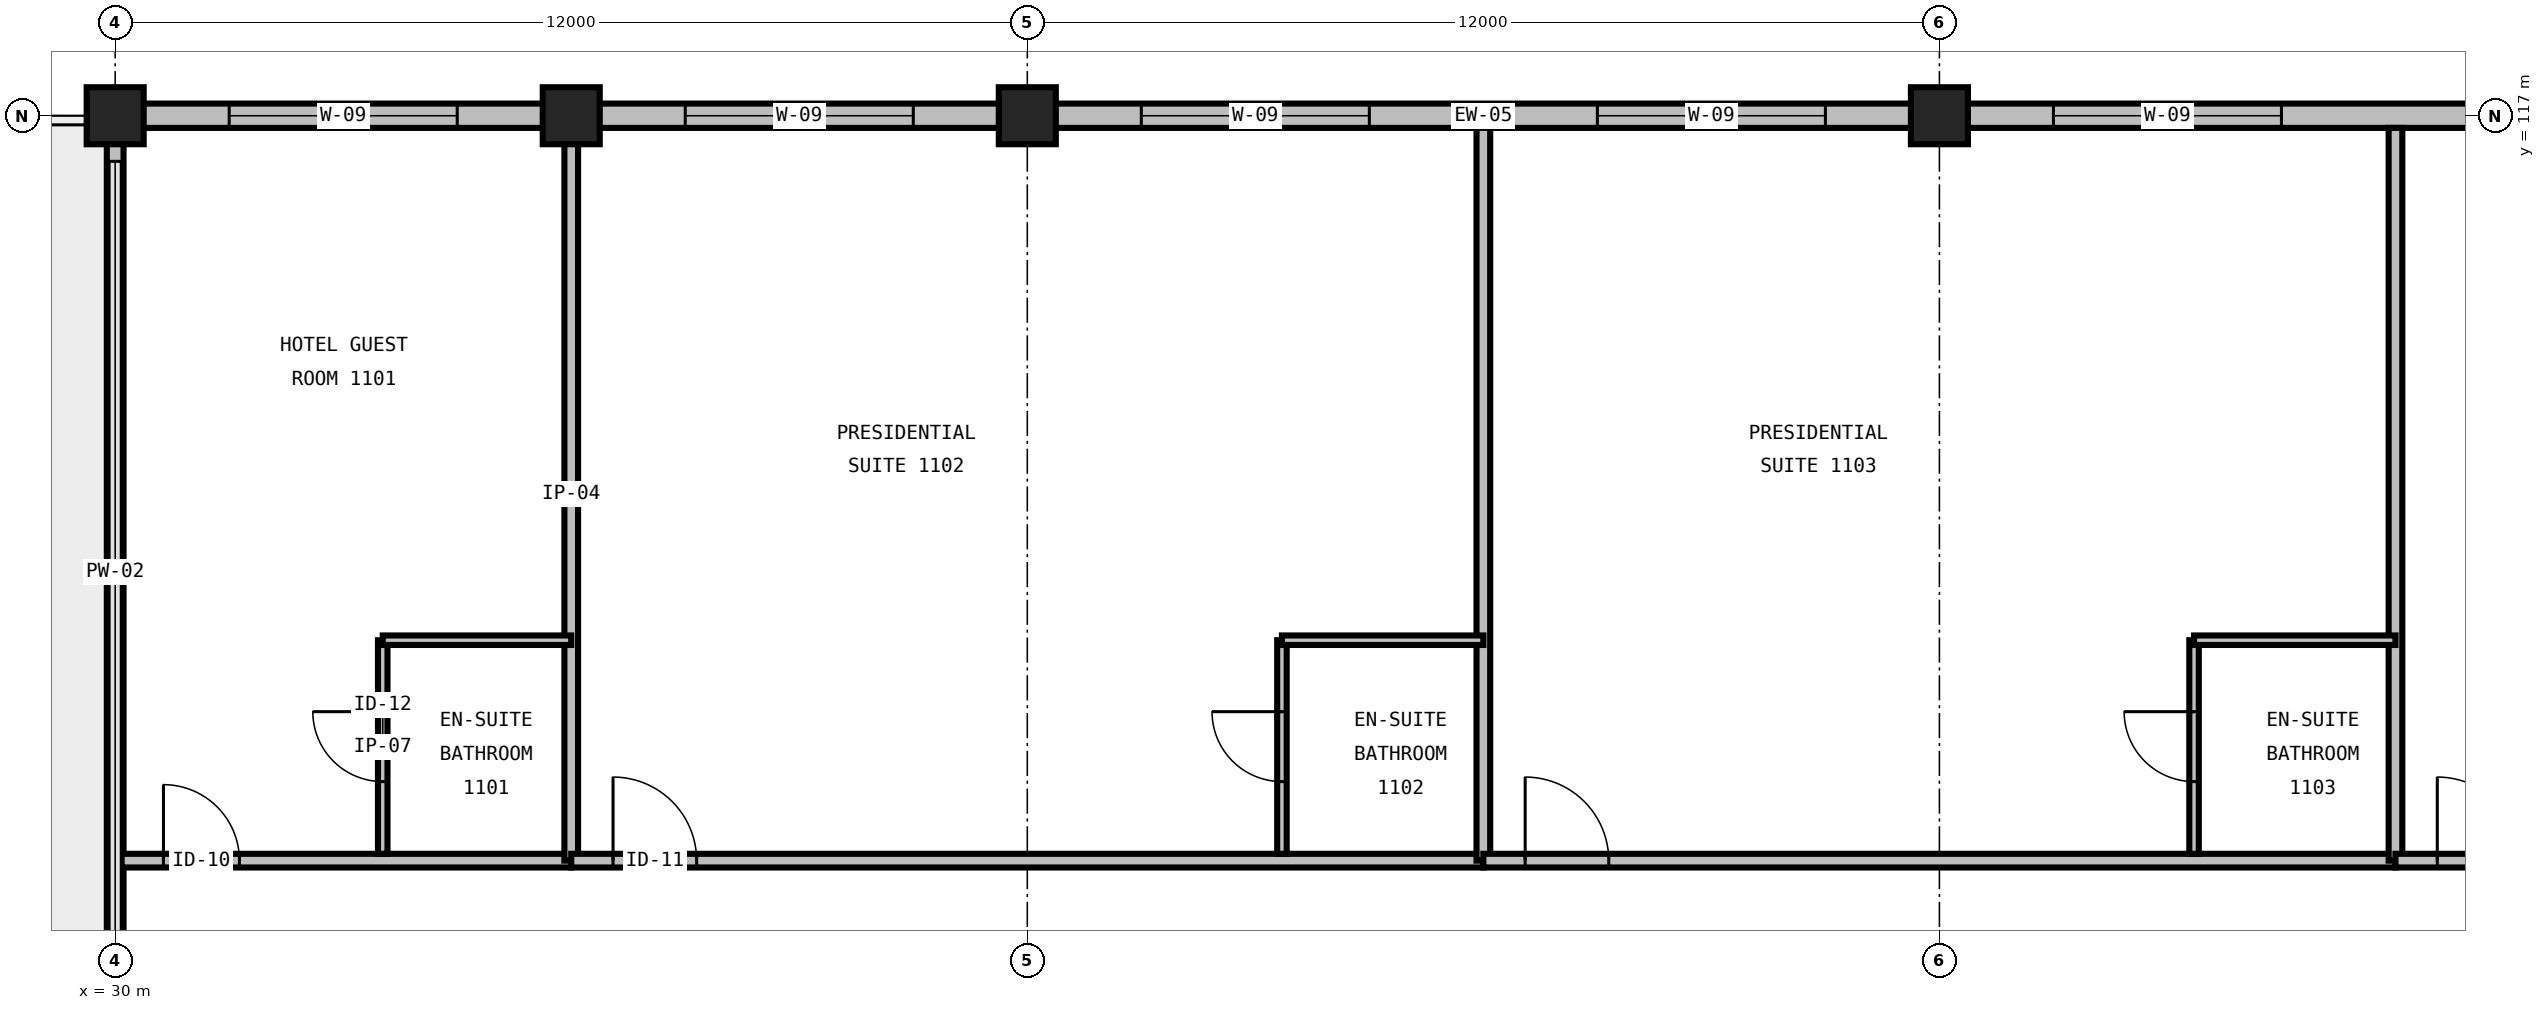
"""IFC4 building model, lengths in metres.
Left out: names, types, materials, properties, quantities, classifications, styles, units other than length and angle.
Written with IfcOpenShell. Run it as: python <this file> out.ifc"""

import sys

from ifc_helpers import new_model, si_unit, direction, frame, frame_2d, origin, origin_2d, place, context, subcontext, project, spatial, rectangle, extrude, element, fill, save


model = new_model("IFC4")
c1 = context("Model", 3, precision=1e-05, world=origin(), true_north=direction((0.0, 1.0)))
c2 = subcontext(c1, "Body", "Model", "MODEL_VIEW")
j1 = project(units=[si_unit("LENGTHUNIT", "METRE"), si_unit("PLANEANGLEUNIT", "RADIAN")], contexts=[c1])
p1 = place(None, origin())
s1 = spatial("IfcSite", under=j1, at=p1, CompositionType="ELEMENT")
p2 = place(p1, origin())
s2 = spatial("IfcBuilding", under=s1, at=p2, CompositionType="ELEMENT")
p3 = place(p2, frame((0.0, 0.0, 49.2)))
s3 = spatial("IfcBuildingStorey", under=s2, at=p3, CompositionType="ELEMENT", Elevation=49.2)
for number, where, z_axis, x_axis in (
    (1, (30.0, 117.0, 0.0), (0.0, 0.0, 1.0), (1.0, 0.0, 0.0)),
    (2, (36.0, 117.0, 0.0), (0.0, 0.0, 1.0), (1.0, 0.0, 0.0)),
    (3, (42.0, 117.0, 0.0), (0.0, 0.0, 1.0), (1.0, 0.0, 0.0)),
    (4, (54.0, 117.0, 0.0), (0.0, 0.0, 1.0), (1.0, 0.0, 0.0)),
):
    element("IfcColumn", number, at=place(p3, frame(where, z_axis=z_axis, x_axis=x_axis)), inside=s3, PredefinedType="COLUMN", context=c2, shape_type="SweptSolid", body=[
        extrude(rectangle(XDim=0.75, YDim=0.75, at=origin_2d()), origin(), (0.0, 0.0, 1.0), 3.6),
    ])
p4 = place(p3, frame((36.0, 117.0, 0.0), z_axis=(0.0, 0.0, 1.0), x_axis=(-1.0, 0.0, 0.0)))
e5 = element("IfcWall", 5, at=p4, inside=s3, PredefinedType="STANDARD", context=c2, shape_type="SweptSolid", body=[
    extrude(rectangle(XDim=6.0, YDim=0.32, at=frame_2d((3.0, 0.0))), origin(), (0.0, 0.0, 1.0), 2.536),
])
p5 = place(p4, frame((1.5, 0.0, 0.7)))
e6 = element("IfcOpeningElement", 6, at=p5, cuts=e5, PredefinedType="OPENING", context=c2, shape_type="SweptSolid", body=[
    extrude(rectangle(XDim=3.0, YDim=1.71, at=frame_2d((1.5, 0.855))), frame((0.0, 0.175, 0.0), z_axis=(0.0, -1.0, 0.0), x_axis=(1.0, 0.0, 0.0)), (0.0, 0.0, 1.0), 0.35),
])
p6 = place(p3, frame((42.0, 117.0, 0.0), z_axis=(0.0, 0.0, 1.0), x_axis=(-1.0, 0.0, 0.0)))
e7 = element("IfcWall", 7, at=p6, inside=s3, PredefinedType="STANDARD", context=c2, shape_type="SweptSolid", body=[
    extrude(rectangle(XDim=6.0, YDim=0.32, at=frame_2d((3.0, 0.0))), origin(), (0.0, 0.0, 1.0), 2.536),
])
p7 = place(p6, frame((1.5, 0.0, 0.7)))
e8 = element("IfcOpeningElement", 8, at=p7, cuts=e7, PredefinedType="OPENING", context=c2, shape_type="SweptSolid", body=[
    extrude(rectangle(XDim=3.0, YDim=1.71, at=frame_2d((1.5, 0.855))), frame((0.0, 0.175, 0.0), z_axis=(0.0, -1.0, 0.0), x_axis=(1.0, 0.0, 0.0)), (0.0, 0.0, 1.0), 0.35),
])
p8 = place(p3, frame((54.0, 117.0, 0.0), z_axis=(0.0, 0.0, 1.0), x_axis=(-1.0, 0.0, 0.0)))
e9 = element("IfcWall", 9, at=p8, inside=s3, PredefinedType="STANDARD", context=c2, shape_type="SweptSolid", body=[
    extrude(rectangle(XDim=12.0, YDim=0.32, at=frame_2d((6.0, 0.0))), origin(), (0.0, 0.0, 1.0), 2.536),
])
p9 = place(p8, frame((1.5, 0.0, 0.7)))
e10 = element("IfcOpeningElement", 10, at=p9, cuts=e9, PredefinedType="OPENING", context=c2, shape_type="SweptSolid", body=[
    extrude(rectangle(XDim=3.0, YDim=1.71, at=frame_2d((1.5, 0.855))), frame((0.0, 0.175, 0.0), z_axis=(0.0, -1.0, 0.0), x_axis=(1.0, 0.0, 0.0)), (0.0, 0.0, 1.0), 0.35),
])
p10 = place(p8, frame((7.5, 0.0, 0.7)))
e11 = element("IfcOpeningElement", 11, at=p10, cuts=e9, PredefinedType="OPENING", context=c2, shape_type="SweptSolid", body=[
    extrude(rectangle(XDim=3.0, YDim=1.71, at=frame_2d((1.5, 0.855))), frame((0.0, 0.175, 0.0), z_axis=(0.0, -1.0, 0.0), x_axis=(1.0, 0.0, 0.0)), (0.0, 0.0, 1.0), 0.35),
])
p11 = place(p3, frame((66.0, 117.0, 0.0), z_axis=(0.0, 0.0, 1.0), x_axis=(-1.0, 0.0, 0.0)))
e12 = element("IfcWall", 12, at=p11, inside=s3, PredefinedType="STANDARD", context=c2, shape_type="SweptSolid", body=[
    extrude(rectangle(XDim=12.0, YDim=0.32, at=frame_2d((6.0, 0.0))), origin(), (0.0, 0.0, 1.0), 2.536),
])
p12 = place(p11, frame((1.5, 0.0, 0.7)))
e13 = element("IfcOpeningElement", 13, at=p12, cuts=e12, PredefinedType="OPENING", context=c2, shape_type="SweptSolid", body=[
    extrude(rectangle(XDim=3.0, YDim=1.71, at=frame_2d((1.5, 0.855))), frame((0.0, 0.175, 0.0), z_axis=(0.0, -1.0, 0.0), x_axis=(1.0, 0.0, 0.0)), (0.0, 0.0, 1.0), 0.35),
])
p13 = place(p11, frame((7.5, 0.0, 0.7)))
e14 = element("IfcOpeningElement", 14, at=p13, cuts=e12, PredefinedType="OPENING", context=c2, shape_type="SweptSolid", body=[
    extrude(rectangle(XDim=3.0, YDim=1.71, at=frame_2d((1.5, 0.855))), frame((0.0, 0.175, 0.0), z_axis=(0.0, -1.0, 0.0), x_axis=(1.0, 0.0, 0.0)), (0.0, 0.0, 1.0), 0.35),
])
p14 = place(p3, frame((30.0, 117.0, 0.0), z_axis=(0.0, 0.0, 1.0), x_axis=(0.0, -1.0, 0.0)))
e15 = element("IfcWall", 15, at=p14, inside=s3, PredefinedType="PARAPET", context=c2, shape_type="SweptSolid", body=[
    extrude(rectangle(XDim=12.0, YDim=0.22, at=frame_2d((6.0, 0.0))), origin(), (0.0, 0.0, 1.0), 0.2),
])
p15 = place(p3, frame((30.085, 107.2, 0.0), z_axis=(0.0, 0.0, 1.0), x_axis=(1.0, 0.0, 0.0)))
e16 = element("IfcWall", 16, at=p15, inside=s3, PredefinedType="PARTITIONING", context=c2, shape_type="SweptSolid", body=[
    extrude(rectangle(XDim=5.915, YDim=0.18, at=frame_2d((2.957, 0.0))), origin(), (0.0, 0.0, 1.0), 3.29),
])
p16 = place(p15, frame((0.55, 0.0, 0.0)))
e17 = element("IfcOpeningElement", 17, at=p16, cuts=e16, PredefinedType="OPENING", context=c2, shape_type="SweptSolid", body=[
    extrude(rectangle(XDim=1.0, YDim=2.15, at=frame_2d((0.5, 1.075))), frame((0.0, 0.105, 0.0), z_axis=(0.0, -1.0, 0.0), x_axis=(1.0, 0.0, 0.0)), (0.0, 0.0, 1.0), 0.21),
])
p17 = place(p3, frame((36.0, 107.2, 0.0), z_axis=(0.0, 0.0, 1.0), x_axis=(0.0, 1.0, 0.0)))
e18 = element("IfcWall", 18, at=p17, inside=s3, PredefinedType="PARTITIONING", context=c2, shape_type="SweptSolid", body=[
    extrude(rectangle(XDim=9.64, YDim=0.18, at=frame_2d((4.82, 0.0))), origin(), (0.0, 0.0, 1.0), 2.59),
])
p18 = place(p3, frame((33.52, 107.29, 0.0), z_axis=(0.0, 0.0, 1.0), x_axis=(0.0, 1.0, 0.0)))
e19 = element("IfcWall", 19, at=p18, inside=s3, PredefinedType="PARTITIONING", context=c2, shape_type="SweptSolid", body=[
    extrude(rectangle(XDim=2.81, YDim=0.125, at=frame_2d((1.405, 0.0))), origin(), (0.0, 0.0, 1.0), 3.29),
])
p19 = place(p18, frame((0.95, 0.0, 0.0)))
e20 = element("IfcOpeningElement", 20, at=p19, cuts=e19, PredefinedType="OPENING", context=c2, shape_type="SweptSolid", body=[
    extrude(rectangle(XDim=0.92, YDim=2.1, at=frame_2d((0.46, 1.05))), frame((0.0, 0.077, 0.0), z_axis=(0.0, -1.0, 0.0), x_axis=(1.0, 0.0, 0.0)), (0.0, 0.0, 1.0), 0.155),
])
p20 = place(p3, frame((33.52, 110.1, 0.0), z_axis=(0.0, 0.0, 1.0), x_axis=(1.0, 0.0, 0.0)))
e21 = element("IfcWall", 21, at=p20, inside=s3, PredefinedType="PARTITIONING", context=c2, shape_type="SweptSolid", body=[
    extrude(rectangle(XDim=2.48, YDim=0.125, at=frame_2d((1.24, 0.0))), origin(), (0.0, 0.0, 1.0), 3.29),
])
p21 = place(p3, frame((36.0, 107.2, 0.0), z_axis=(0.0, 0.0, 1.0), x_axis=(1.0, 0.0, 0.0)))
e22 = element("IfcWall", 22, at=p21, inside=s3, PredefinedType="PARTITIONING", context=c2, shape_type="SweptSolid", body=[
    extrude(rectangle(XDim=12.0, YDim=0.18, at=frame_2d((6.0, 0.0))), origin(), (0.0, 0.0, 1.0), 3.29),
])
p22 = place(p21, frame((0.55, 0.0, 0.0)))
e23 = element("IfcOpeningElement", 23, at=p22, cuts=e22, PredefinedType="OPENING", context=c2, shape_type="SweptSolid", body=[
    extrude(rectangle(XDim=1.1, YDim=2.2, at=frame_2d((0.55, 1.1))), frame((0.0, 0.105, 0.0), z_axis=(0.0, -1.0, 0.0), x_axis=(1.0, 0.0, 0.0)), (0.0, 0.0, 1.0), 0.21),
])
p23 = place(p3, frame((48.0, 107.2, 0.0), z_axis=(0.0, 0.0, 1.0), x_axis=(0.0, 1.0, 0.0)))
e24 = element("IfcWall", 24, at=p23, inside=s3, PredefinedType="PARTITIONING", context=c2, shape_type="SweptSolid", body=[
    extrude(rectangle(XDim=9.64, YDim=0.18, at=frame_2d((4.82, 0.0))), origin(), (0.0, 0.0, 1.0), 3.29),
])
p24 = place(p3, frame((45.35, 107.29, 0.0), z_axis=(0.0, 0.0, 1.0), x_axis=(0.0, 1.0, 0.0)))
e25 = element("IfcWall", 25, at=p24, inside=s3, PredefinedType="PARTITIONING", context=c2, shape_type="SweptSolid", body=[
    extrude(rectangle(XDim=2.81, YDim=0.125, at=frame_2d((1.405, 0.0))), origin(), (0.0, 0.0, 1.0), 3.29),
])
p25 = place(p24, frame((0.95, 0.0, 0.0)))
e26 = element("IfcOpeningElement", 26, at=p25, cuts=e25, PredefinedType="OPENING", context=c2, shape_type="SweptSolid", body=[
    extrude(rectangle(XDim=0.92, YDim=2.1, at=frame_2d((0.46, 1.05))), frame((0.0, 0.077, 0.0), z_axis=(0.0, -1.0, 0.0), x_axis=(1.0, 0.0, 0.0)), (0.0, 0.0, 1.0), 0.155),
])
p26 = place(p3, frame((45.35, 110.1, 0.0), z_axis=(0.0, 0.0, 1.0), x_axis=(1.0, 0.0, 0.0)))
e27 = element("IfcWall", 27, at=p26, inside=s3, PredefinedType="PARTITIONING", context=c2, shape_type="SweptSolid", body=[
    extrude(rectangle(XDim=2.65, YDim=0.125, at=frame_2d((1.325, 0.0))), origin(), (0.0, 0.0, 1.0), 3.29),
])
p27 = place(p3, frame((48.0, 107.2, 0.0), z_axis=(0.0, 0.0, 1.0), x_axis=(1.0, 0.0, 0.0)))
e28 = element("IfcWall", 28, at=p27, inside=s3, PredefinedType="PARTITIONING", context=c2, shape_type="SweptSolid", body=[
    extrude(rectangle(XDim=12.0, YDim=0.18, at=frame_2d((6.0, 0.0))), origin(), (0.0, 0.0, 1.0), 3.29),
])
p28 = place(p27, frame((0.55, 0.0, 0.0)))
e29 = element("IfcOpeningElement", 29, at=p28, cuts=e28, PredefinedType="OPENING", context=c2, shape_type="SweptSolid", body=[
    extrude(rectangle(XDim=1.1, YDim=2.2, at=frame_2d((0.55, 1.1))), frame((0.0, 0.105, 0.0), z_axis=(0.0, -1.0, 0.0), x_axis=(1.0, 0.0, 0.0)), (0.0, 0.0, 1.0), 0.21),
])
p29 = place(p3, frame((60.0, 107.2, 0.0), z_axis=(0.0, 0.0, 1.0), x_axis=(0.0, 1.0, 0.0)))
e30 = element("IfcWall", 30, at=p29, inside=s3, PredefinedType="PARTITIONING", context=c2, shape_type="SweptSolid", body=[
    extrude(rectangle(XDim=9.64, YDim=0.18, at=frame_2d((4.82, 0.0))), origin(), (0.0, 0.0, 1.0), 3.29),
])
p30 = place(p3, frame((57.35, 107.29, 0.0), z_axis=(0.0, 0.0, 1.0), x_axis=(0.0, 1.0, 0.0)))
e31 = element("IfcWall", 31, at=p30, inside=s3, PredefinedType="PARTITIONING", context=c2, shape_type="SweptSolid", body=[
    extrude(rectangle(XDim=2.81, YDim=0.125, at=frame_2d((1.405, 0.0))), origin(), (0.0, 0.0, 1.0), 3.29),
])
p31 = place(p30, frame((0.95, 0.0, 0.0)))
e32 = element("IfcOpeningElement", 32, at=p31, cuts=e31, PredefinedType="OPENING", context=c2, shape_type="SweptSolid", body=[
    extrude(rectangle(XDim=0.92, YDim=2.1, at=frame_2d((0.46, 1.05))), frame((0.0, 0.077, 0.0), z_axis=(0.0, -1.0, 0.0), x_axis=(1.0, 0.0, 0.0)), (0.0, 0.0, 1.0), 0.155),
])
p32 = place(p3, frame((57.35, 110.1, 0.0), z_axis=(0.0, 0.0, 1.0), x_axis=(1.0, 0.0, 0.0)))
e33 = element("IfcWall", 33, at=p32, inside=s3, PredefinedType="PARTITIONING", context=c2, shape_type="SweptSolid", body=[
    extrude(rectangle(XDim=2.65, YDim=0.125, at=frame_2d((1.325, 0.0))), origin(), (0.0, 0.0, 1.0), 3.29),
])
p33 = place(p3, frame((60.0, 107.2, 0.0), z_axis=(0.0, 0.0, 1.0), x_axis=(1.0, 0.0, 0.0)))
e34 = element("IfcWall", 34, at=p33, inside=s3, PredefinedType="PARTITIONING", context=c2, shape_type="SweptSolid", body=[
    extrude(rectangle(XDim=12.0, YDim=0.18, at=frame_2d((6.0, 0.0))), origin(), (0.0, 0.0, 1.0), 3.29),
])
p34 = place(p33, frame((0.55, 0.0, 0.0)))
e35 = element("IfcOpeningElement", 35, at=p34, cuts=e34, PredefinedType="OPENING", context=c2, shape_type="SweptSolid", body=[
    extrude(rectangle(XDim=1.1, YDim=2.2, at=frame_2d((0.55, 1.1))), frame((0.0, 0.105, 0.0), z_axis=(0.0, -1.0, 0.0), x_axis=(1.0, 0.0, 0.0)), (0.0, 0.0, 1.0), 0.21),
])
p35 = place(p5, origin())
e36 = element("IfcWindow", 36, at=p35, inside=s3, PartitioningType="TRIPLE_PANEL_VERTICAL", PredefinedType="WINDOW", context=c2, shape_type="SweptSolid", body=[
    extrude(rectangle(XDim=3.0, YDim=1.71, at=frame_2d((1.5, 0.855))), frame((0.0, 0.03, 0.0), z_axis=(0.0, -1.0, 0.0), x_axis=(1.0, 0.0, 0.0)), (0.0, 0.0, 1.0), 0.06),
])
fill(e6, e36)
p36 = place(p7, origin())
e37 = element("IfcWindow", 37, at=p36, inside=s3, PartitioningType="TRIPLE_PANEL_VERTICAL", PredefinedType="WINDOW", context=c2, shape_type="SweptSolid", body=[
    extrude(rectangle(XDim=3.0, YDim=1.71, at=frame_2d((1.5, 0.855))), frame((0.0, 0.03, 0.0), z_axis=(0.0, -1.0, 0.0), x_axis=(1.0, 0.0, 0.0)), (0.0, 0.0, 1.0), 0.06),
])
fill(e8, e37)
p37 = place(p9, origin())
e38 = element("IfcWindow", 38, at=p37, inside=s3, PartitioningType="TRIPLE_PANEL_VERTICAL", PredefinedType="WINDOW", context=c2, shape_type="SweptSolid", body=[
    extrude(rectangle(XDim=3.0, YDim=1.71, at=frame_2d((1.5, 0.855))), frame((0.0, 0.03, 0.0), z_axis=(0.0, -1.0, 0.0), x_axis=(1.0, 0.0, 0.0)), (0.0, 0.0, 1.0), 0.06),
])
fill(e10, e38)
p38 = place(p10, origin())
e39 = element("IfcWindow", 39, at=p38, inside=s3, PartitioningType="TRIPLE_PANEL_VERTICAL", PredefinedType="WINDOW", context=c2, shape_type="SweptSolid", body=[
    extrude(rectangle(XDim=3.0, YDim=1.71, at=frame_2d((1.5, 0.855))), frame((0.0, 0.03, 0.0), z_axis=(0.0, -1.0, 0.0), x_axis=(1.0, 0.0, 0.0)), (0.0, 0.0, 1.0), 0.06),
])
fill(e11, e39)
p39 = place(p13, origin())
e40 = element("IfcWindow", 40, at=p39, inside=s3, PartitioningType="TRIPLE_PANEL_VERTICAL", PredefinedType="WINDOW", context=c2, shape_type="SweptSolid", body=[
    extrude(rectangle(XDim=3.0, YDim=1.71, at=frame_2d((1.5, 0.855))), frame((0.0, 0.03, 0.0), z_axis=(0.0, -1.0, 0.0), x_axis=(1.0, 0.0, 0.0)), (0.0, 0.0, 1.0), 0.06),
])
fill(e14, e40)
p40 = place(p16, origin())
e41 = element("IfcDoor", 41, at=p40, inside=s3, OperationType="SINGLE_SWING_LEFT", PredefinedType="DOOR", context=c2, shape_type="SweptSolid", body=[
    extrude(rectangle(XDim=1.0, YDim=2.15, at=frame_2d((0.5, 1.075))), frame((0.0, 0.025, 0.0), z_axis=(0.0, -1.0, 0.0), x_axis=(1.0, 0.0, 0.0)), (0.0, 0.0, 1.0), 0.05),
])
fill(e17, e41)
p41 = place(p19, origin())
e42 = element("IfcDoor", 42, at=p41, inside=s3, OperationType="SINGLE_SWING_RIGHT", PredefinedType="DOOR", context=c2, shape_type="SweptSolid", body=[
    extrude(rectangle(XDim=0.92, YDim=2.1, at=frame_2d((0.46, 1.05))), frame((0.0, 0.025, 0.0), z_axis=(0.0, -1.0, 0.0), x_axis=(1.0, 0.0, 0.0)), (0.0, 0.0, 1.0), 0.05),
])
fill(e20, e42)
p42 = place(p22, origin())
e43 = element("IfcDoor", 43, at=p42, inside=s3, OperationType="SINGLE_SWING_LEFT", PredefinedType="DOOR", context=c2, shape_type="SweptSolid", body=[
    extrude(rectangle(XDim=1.1, YDim=2.2, at=frame_2d((0.55, 1.1))), frame((0.0, 0.025, 0.0), z_axis=(0.0, -1.0, 0.0), x_axis=(1.0, 0.0, 0.0)), (0.0, 0.0, 1.0), 0.05),
])
fill(e23, e43)
p43 = place(p25, origin())
e44 = element("IfcDoor", 44, at=p43, inside=s3, OperationType="SINGLE_SWING_RIGHT", PredefinedType="DOOR", context=c2, shape_type="SweptSolid", body=[
    extrude(rectangle(XDim=0.92, YDim=2.1, at=frame_2d((0.46, 1.05))), frame((0.0, 0.025, 0.0), z_axis=(0.0, -1.0, 0.0), x_axis=(1.0, 0.0, 0.0)), (0.0, 0.0, 1.0), 0.05),
])
fill(e26, e44)
p44 = place(p28, origin())
e45 = element("IfcDoor", 45, at=p44, inside=s3, OperationType="SINGLE_SWING_LEFT", PredefinedType="DOOR", context=c2, shape_type="SweptSolid", body=[
    extrude(rectangle(XDim=1.1, YDim=2.2, at=frame_2d((0.55, 1.1))), frame((0.0, 0.025, 0.0), z_axis=(0.0, -1.0, 0.0), x_axis=(1.0, 0.0, 0.0)), (0.0, 0.0, 1.0), 0.05),
])
fill(e29, e45)
p45 = place(p31, origin())
e46 = element("IfcDoor", 46, at=p45, inside=s3, OperationType="SINGLE_SWING_RIGHT", PredefinedType="DOOR", context=c2, shape_type="SweptSolid", body=[
    extrude(rectangle(XDim=0.92, YDim=2.1, at=frame_2d((0.46, 1.05))), frame((0.0, 0.025, 0.0), z_axis=(0.0, -1.0, 0.0), x_axis=(1.0, 0.0, 0.0)), (0.0, 0.0, 1.0), 0.05),
])
fill(e32, e46)
p46 = place(p34, origin())
e47 = element("IfcDoor", 47, at=p46, inside=s3, OperationType="SINGLE_SWING_LEFT", PredefinedType="DOOR", context=c2, shape_type="SweptSolid", body=[
    extrude(rectangle(XDim=1.1, YDim=2.2, at=frame_2d((0.55, 1.1))), frame((0.0, 0.025, 0.0), z_axis=(0.0, -1.0, 0.0), x_axis=(1.0, 0.0, 0.0)), (0.0, 0.0, 1.0), 0.05),
])
fill(e35, e47)
save(model, sys.argv[1])
